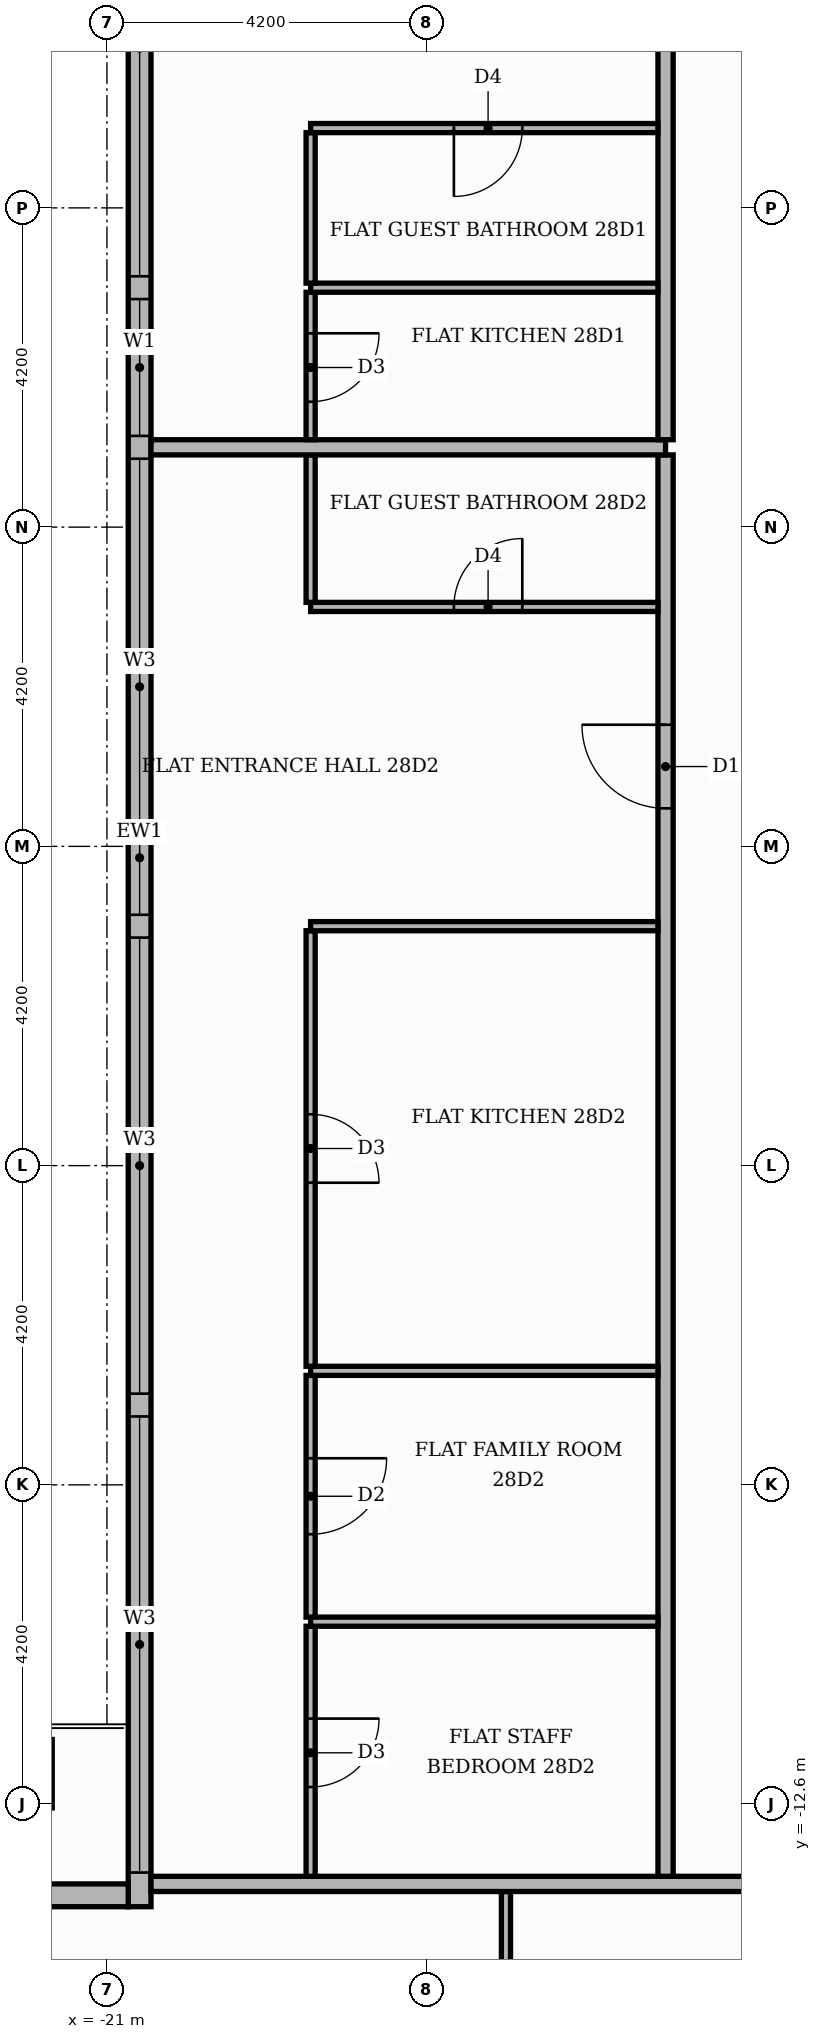
"""IFC4 building model, lengths in metres.
Left out: names, types, materials, properties, quantities, classifications, styles, units other than length and angle.
Written with IfcOpenShell. Run it as: python <this file> out.ifc"""

import sys

from ifc_helpers import new_model, si_unit, direction, frame, frame_2d, origin, place, context, subcontext, project, spatial, rectangle, extrude, element, fill, save


model = new_model("IFC4")
c1 = context("Model", 3, precision=1e-05, world=origin(), true_north=direction((0.0, 1.0)))
c2 = subcontext(c1, "Body", "Model", "MODEL_VIEW")
j1 = project(units=[si_unit("LENGTHUNIT", "METRE"), si_unit("PLANEANGLEUNIT", "RADIAN")], contexts=[c1])
p1 = place(None, origin())
s1 = spatial("IfcSite", under=j1, at=p1, CompositionType="ELEMENT")
p2 = place(p1, origin())
s2 = spatial("IfcBuilding", under=s1, at=p2, CompositionType="ELEMENT")
p3 = place(p2, frame((0.0, 0.0, 118.2)))
s3 = spatial("IfcBuildingStorey", under=s2, at=p3, CompositionType="ELEMENT", Elevation=118.2)
p4 = place(p3, frame((-20.57, 13.65, 0.0), z_axis=(0.0, 0.0, 1.0), x_axis=(0.0, -1.0, 0.0)))
e1 = element("IfcWall", 1, at=p4, inside=s3, PredefinedType="STANDARD", context=c2, shape_type="SweptSolid", body=[
    extrude(rectangle(XDim=27.6, YDim=0.3, at=frame_2d((13.8, 0.0))), origin(), (0.0, 0.0, 1.0), 3.48),
])
p5 = place(p4, frame((0.15, 0.0, 0.9)))
e2 = element("IfcOpeningElement", 2, at=p5, cuts=e1, PredefinedType="OPENING", context=c2, shape_type="SweptSolid", body=[
    extrude(rectangle(XDim=6.0, YDim=2.1, at=frame_2d((3.0, 1.05))), frame((0.0, 0.16, 0.0), z_axis=(0.0, -1.0, 0.0), x_axis=(1.0, 0.0, 0.0)), (0.0, 0.0, 1.0), 0.32),
])
p6 = place(p4, frame((6.45, 0.0, 0.9)))
e3 = element("IfcOpeningElement", 3, at=p6, cuts=e1, PredefinedType="OPENING", context=c2, shape_type="SweptSolid", body=[
    extrude(rectangle(XDim=1.8, YDim=2.1, at=frame_2d((0.9, 1.05))), frame((0.0, 0.16, 0.0), z_axis=(0.0, -1.0, 0.0), x_axis=(1.0, 0.0, 0.0)), (0.0, 0.0, 1.0), 0.32),
])
p7 = place(p4, frame((8.55, 0.0, 0.9)))
e4 = element("IfcOpeningElement", 4, at=p7, cuts=e1, PredefinedType="OPENING", context=c2, shape_type="SweptSolid", body=[
    extrude(rectangle(XDim=6.0, YDim=2.1, at=frame_2d((3.0, 1.05))), frame((0.0, 0.16, 0.0), z_axis=(0.0, -1.0, 0.0), x_axis=(1.0, 0.0, 0.0)), (0.0, 0.0, 1.0), 0.32),
])
p8 = place(p4, frame((14.85, 0.0, 0.9)))
e5 = element("IfcOpeningElement", 5, at=p8, cuts=e1, PredefinedType="OPENING", context=c2, shape_type="SweptSolid", body=[
    extrude(rectangle(XDim=6.0, YDim=2.1, at=frame_2d((3.0, 1.05))), frame((0.0, 0.16, 0.0), z_axis=(0.0, -1.0, 0.0), x_axis=(1.0, 0.0, 0.0)), (0.0, 0.0, 1.0), 0.32),
])
p9 = place(p4, frame((21.15, 0.0, 0.9)))
e6 = element("IfcOpeningElement", 6, at=p9, cuts=e1, PredefinedType="OPENING", context=c2, shape_type="SweptSolid", body=[
    extrude(rectangle(XDim=6.0, YDim=2.1, at=frame_2d((3.0, 1.05))), frame((0.0, 0.16, 0.0), z_axis=(0.0, -1.0, 0.0), x_axis=(1.0, 0.0, 0.0)), (0.0, 0.0, 1.0), 0.32),
])
p10 = place(p3, frame((-20.72, -13.8, 0.0), z_axis=(0.0, 0.0, 1.0), x_axis=(-1.0, 0.0, 0.0)))
e7 = element("IfcWall", 7, at=p10, inside=s3, PredefinedType="STANDARD", context=c2, shape_type="SweptSolid", body=[
    extrude(rectangle(XDim=5.0, YDim=0.3, at=frame_2d((2.5, 0.0))), origin(), (0.0, 0.0, 1.0), 3.48),
])
p11 = place(p10, frame((1.48, 0.0, 0.0)))
e8 = element("IfcOpeningElement", 8, at=p11, cuts=e7, PredefinedType="OPENING", context=c2, shape_type="SweptSolid", body=[
    extrude(rectangle(XDim=1.8, YDim=2.4, at=frame_2d((0.9, 1.2))), frame((0.0, 0.16, 0.0), z_axis=(0.0, -1.0, 0.0), x_axis=(1.0, 0.0, 0.0)), (0.0, 0.0, 1.0), 0.32),
])
p12 = place(p3, frame((-15.75, -20.36, 0.0), z_axis=(0.0, 0.0, 1.0), x_axis=(0.0, 1.0, 0.0)))
e9 = element("IfcWall", 9, at=p12, inside=s3, PredefinedType="PARTITIONING", context=c2, shape_type="SweptSolid", body=[
    extrude(rectangle(XDim=6.61, YDim=0.12, at=frame_2d((3.305, 0.0))), origin(), (0.0, 0.0, 1.0), 3.48),
])
p13 = place(p12, frame((2.825, 0.0, 0.0)))
e10 = element("IfcOpeningElement", 10, at=p13, cuts=e9, PredefinedType="OPENING", context=c2, shape_type="SweptSolid", body=[
    extrude(rectangle(XDim=1.0, YDim=2.1, at=frame_2d((0.5, 1.05))), frame((0.0, 0.07, 0.0), z_axis=(0.0, -1.0, 0.0), x_axis=(1.0, 0.0, 0.0)), (0.0, 0.0, 1.0), 0.14),
])
p14 = place(p3, frame((-20.42, -13.65, 0.0), z_axis=(0.0, 0.0, 1.0), x_axis=(1.0, 0.0, 0.0)))
e11 = element("IfcWall", 11, at=p14, inside=s3, PredefinedType="PARTITIONING", context=c2, shape_type="SweptSolid", body=[
    extrude(rectangle(XDim=34.07, YDim=0.2, at=frame_2d((17.035, 0.0))), origin(), (0.0, 0.0, 1.0), 3.48),
])
p15 = place(p14, frame((8.32, 0.0, 0.0)))
e12 = element("IfcOpeningElement", 12, at=p15, cuts=e11, PredefinedType="OPENING", context=c2, shape_type="SweptSolid", body=[
    extrude(rectangle(XDim=1.1, YDim=2.4, at=frame_2d((0.55, 1.2))), frame((0.0, 0.11, 0.0), z_axis=(0.0, -1.0, 0.0), x_axis=(1.0, 0.0, 0.0)), (0.0, 0.0, 1.0), 0.22),
])
p16 = place(p14, frame((20.92, 0.0, 0.0)))
e13 = element("IfcOpeningElement", 13, at=p16, cuts=e11, PredefinedType="OPENING", context=c2, shape_type="SweptSolid", body=[
    extrude(rectangle(XDim=1.1, YDim=2.4, at=frame_2d((0.55, 1.2))), frame((0.0, 0.11, 0.0), z_axis=(0.0, -1.0, 0.0), x_axis=(1.0, 0.0, 0.0)), (0.0, 0.0, 1.0), 0.22),
])
p17 = place(p3, frame((-18.32, -13.55, 0.0), z_axis=(0.0, 0.0, 1.0), x_axis=(0.0, 1.0, 0.0)))
e14 = element("IfcWall", 14, at=p17, inside=s3, PredefinedType="PARTITIONING", context=c2, shape_type="SweptSolid", body=[
    extrude(rectangle(XDim=3.29, YDim=0.12, at=frame_2d((1.645, 0.0))), origin(), (0.0, 0.0, 1.0), 3.48),
])
p18 = place(p17, frame((1.175, 0.0, 0.0)))
e15 = element("IfcOpeningElement", 15, at=p18, cuts=e14, PredefinedType="OPENING", context=c2, shape_type="SweptSolid", body=[
    extrude(rectangle(XDim=0.9, YDim=2.1, at=frame_2d((0.45, 1.05))), frame((0.0, 0.07, 0.0), z_axis=(0.0, -1.0, 0.0), x_axis=(1.0, 0.0, 0.0)), (0.0, 0.0, 1.0), 0.14),
])
p19 = place(p3, frame((-13.65, -13.55, 0.0), z_axis=(0.0, 0.0, 1.0), x_axis=(0.0, 1.0, 0.0)))
e16 = element("IfcWall", 16, at=p19, inside=s3, PredefinedType="PARTITIONING", context=c2, shape_type="SweptSolid", body=[
    extrude(rectangle(XDim=18.7, YDim=0.2, at=frame_2d((9.35, 0.0))), origin(), (0.0, 0.0, 1.0), 3.48),
])
p20 = place(p19, frame((14.05, 0.0, 0.0)))
e17 = element("IfcOpeningElement", 17, at=p20, cuts=e16, PredefinedType="OPENING", context=c2, shape_type="SweptSolid", body=[
    extrude(rectangle(XDim=1.1, YDim=2.4, at=frame_2d((0.55, 1.2))), frame((0.0, 0.11, 0.0), z_axis=(0.0, -1.0, 0.0), x_axis=(1.0, 0.0, 0.0)), (0.0, 0.0, 1.0), 0.22),
])
p21 = place(p3, frame((-18.32, -10.2, 0.0), z_axis=(0.0, 0.0, 1.0), x_axis=(1.0, 0.0, 0.0)))
e18 = element("IfcWall", 18, at=p21, inside=s3, PredefinedType="PARTITIONING", context=c2, shape_type="SweptSolid", body=[
    extrude(rectangle(XDim=4.57, YDim=0.12, at=frame_2d((2.285, 0.0))), origin(), (0.0, 0.0, 1.0), 3.48),
])
p22 = place(p3, frame((-18.32, -10.14, 0.0), z_axis=(0.0, 0.0, 1.0), x_axis=(0.0, 1.0, 0.0)))
e19 = element("IfcWall", 19, at=p22, inside=s3, PredefinedType="PARTITIONING", context=c2, shape_type="SweptSolid", body=[
    extrude(rectangle(XDim=3.18, YDim=0.12, at=frame_2d((1.59, 0.0))), origin(), (0.0, 0.0, 1.0), 3.48),
])
p23 = place(p22, frame((1.09, 0.0, 0.0)))
e20 = element("IfcOpeningElement", 20, at=p23, cuts=e19, PredefinedType="OPENING", context=c2, shape_type="SweptSolid", body=[
    extrude(rectangle(XDim=1.0, YDim=2.1, at=frame_2d((0.5, 1.05))), frame((0.0, 0.07, 0.0), z_axis=(0.0, -1.0, 0.0), x_axis=(1.0, 0.0, 0.0)), (0.0, 0.0, 1.0), 0.14),
])
p24 = place(p3, frame((-18.32, -6.9, 0.0), z_axis=(0.0, 0.0, 1.0), x_axis=(1.0, 0.0, 0.0)))
e21 = element("IfcWall", 21, at=p24, inside=s3, PredefinedType="PARTITIONING", context=c2, shape_type="SweptSolid", body=[
    extrude(rectangle(XDim=4.57, YDim=0.12, at=frame_2d((2.285, 0.0))), origin(), (0.0, 0.0, 1.0), 3.48),
])
p25 = place(p3, frame((-18.32, -6.84, 0.0), z_axis=(0.0, 0.0, 1.0), x_axis=(0.0, 1.0, 0.0)))
e22 = element("IfcWall", 22, at=p25, inside=s3, PredefinedType="PARTITIONING", context=c2, shape_type="SweptSolid", body=[
    extrude(rectangle(XDim=5.73, YDim=0.12, at=frame_2d((2.865, 0.0))), origin(), (0.0, 0.0, 1.0), 3.48),
])
p26 = place(p25, frame((2.415, 0.0, 0.0)))
e23 = element("IfcOpeningElement", 23, at=p26, cuts=e22, PredefinedType="OPENING", context=c2, shape_type="SweptSolid", body=[
    extrude(rectangle(XDim=0.9, YDim=2.1, at=frame_2d((0.45, 1.05))), frame((0.0, 0.07, 0.0), z_axis=(0.0, -1.0, 0.0), x_axis=(1.0, 0.0, 0.0)), (0.0, 0.0, 1.0), 0.14),
])
p27 = place(p3, frame((-18.32, -1.05, 0.0), z_axis=(0.0, 0.0, 1.0), x_axis=(1.0, 0.0, 0.0)))
e24 = element("IfcWall", 24, at=p27, inside=s3, PredefinedType="PARTITIONING", context=c2, shape_type="SweptSolid", body=[
    extrude(rectangle(XDim=4.57, YDim=0.12, at=frame_2d((2.285, 0.0))), origin(), (0.0, 0.0, 1.0), 3.48),
])
p28 = place(p3, frame((-18.32, 3.15, 0.0), z_axis=(0.0, 0.0, 1.0), x_axis=(1.0, 0.0, 0.0)))
e25 = element("IfcWall", 25, at=p28, inside=s3, PredefinedType="PARTITIONING", context=c2, shape_type="SweptSolid", body=[
    extrude(rectangle(XDim=4.57, YDim=0.12, at=frame_2d((2.285, 0.0))), origin(), (0.0, 0.0, 1.0), 3.48),
])
p29 = place(p28, frame((1.885, 0.0, 0.0)))
e26 = element("IfcOpeningElement", 26, at=p29, cuts=e25, PredefinedType="OPENING", context=c2, shape_type="SweptSolid", body=[
    extrude(rectangle(XDim=0.9, YDim=2.1, at=frame_2d((0.45, 1.05))), frame((0.0, 0.07, 0.0), z_axis=(0.0, -1.0, 0.0), x_axis=(1.0, 0.0, 0.0)), (0.0, 0.0, 1.0), 0.14),
])
p30 = place(p3, frame((-18.32, 3.21, 0.0), z_axis=(0.0, 0.0, 1.0), x_axis=(0.0, 1.0, 0.0)))
e27 = element("IfcWall", 27, at=p30, inside=s3, PredefinedType="PARTITIONING", context=c2, shape_type="SweptSolid", body=[
    extrude(rectangle(XDim=1.94, YDim=0.12, at=frame_2d((0.97, 0.0))), origin(), (0.0, 0.0, 1.0), 3.48),
])
p31 = place(p3, frame((-20.42, 5.25, 0.0), z_axis=(0.0, 0.0, 1.0), x_axis=(1.0, 0.0, 0.0)))
e28 = element("IfcWall", 28, at=p31, inside=s3, PredefinedType="PARTITIONING", context=c2, shape_type="SweptSolid", body=[
    extrude(rectangle(XDim=6.77, YDim=0.2, at=frame_2d((3.385, 0.0))), origin(), (0.0, 0.0, 1.0), 3.48),
])
p32 = place(p3, frame((-18.32, 5.35, 0.0), z_axis=(0.0, 0.0, 1.0), x_axis=(0.0, 1.0, 0.0)))
e29 = element("IfcWall", 29, at=p32, inside=s3, PredefinedType="PARTITIONING", context=c2, shape_type="SweptSolid", body=[
    extrude(rectangle(XDim=1.94, YDim=0.12, at=frame_2d((0.97, 0.0))), origin(), (0.0, 0.0, 1.0), 3.48),
])
p33 = place(p32, frame((0.5, 0.0, 0.0)))
e30 = element("IfcOpeningElement", 30, at=p33, cuts=e29, PredefinedType="OPENING", context=c2, shape_type="SweptSolid", body=[
    extrude(rectangle(XDim=0.9, YDim=2.1, at=frame_2d((0.45, 1.05))), frame((0.0, 0.07, 0.0), z_axis=(0.0, -1.0, 0.0), x_axis=(1.0, 0.0, 0.0)), (0.0, 0.0, 1.0), 0.14),
])
p34 = place(p3, frame((-13.65, 5.35, 0.0), z_axis=(0.0, 0.0, 1.0), x_axis=(0.0, 1.0, 0.0)))
e31 = element("IfcWall", 31, at=p34, inside=s3, PredefinedType="PARTITIONING", context=c2, shape_type="SweptSolid", body=[
    extrude(rectangle(XDim=8.2, YDim=0.2, at=frame_2d((4.1, 0.0))), origin(), (0.0, 0.0, 1.0), 3.48),
])
p35 = place(p34, frame((5.65, 0.0, 0.0)))
e32 = element("IfcOpeningElement", 32, at=p35, cuts=e31, PredefinedType="OPENING", context=c2, shape_type="SweptSolid", body=[
    extrude(rectangle(XDim=1.1, YDim=2.4, at=frame_2d((0.55, 1.2))), frame((0.0, 0.11, 0.0), z_axis=(0.0, -1.0, 0.0), x_axis=(1.0, 0.0, 0.0)), (0.0, 0.0, 1.0), 0.22),
])
p36 = place(p3, frame((-18.32, 7.35, 0.0), z_axis=(0.0, 0.0, 1.0), x_axis=(1.0, 0.0, 0.0)))
e33 = element("IfcWall", 33, at=p36, inside=s3, PredefinedType="PARTITIONING", context=c2, shape_type="SweptSolid", body=[
    extrude(rectangle(XDim=4.57, YDim=0.12, at=frame_2d((2.285, 0.0))), origin(), (0.0, 0.0, 1.0), 3.48),
])
p37 = place(p3, frame((-18.32, 7.41, 0.0), z_axis=(0.0, 0.0, 1.0), x_axis=(0.0, 1.0, 0.0)))
e34 = element("IfcWall", 34, at=p37, inside=s3, PredefinedType="PARTITIONING", context=c2, shape_type="SweptSolid", body=[
    extrude(rectangle(XDim=1.98, YDim=0.12, at=frame_2d((0.99, 0.0))), origin(), (0.0, 0.0, 1.0), 3.48),
])
p38 = place(p3, frame((-18.32, 9.45, 0.0), z_axis=(0.0, 0.0, 1.0), x_axis=(1.0, 0.0, 0.0)))
e35 = element("IfcWall", 35, at=p38, inside=s3, PredefinedType="PARTITIONING", context=c2, shape_type="SweptSolid", body=[
    extrude(rectangle(XDim=4.57, YDim=0.12, at=frame_2d((2.285, 0.0))), origin(), (0.0, 0.0, 1.0), 3.48),
])
p39 = place(p38, frame((1.885, 0.0, 0.0)))
e36 = element("IfcOpeningElement", 36, at=p39, cuts=e35, PredefinedType="OPENING", context=c2, shape_type="SweptSolid", body=[
    extrude(rectangle(XDim=0.9, YDim=2.1, at=frame_2d((0.45, 1.05))), frame((0.0, 0.07, 0.0), z_axis=(0.0, -1.0, 0.0), x_axis=(1.0, 0.0, 0.0)), (0.0, 0.0, 1.0), 0.14),
])
p40 = place(p5, origin())
e37 = element("IfcWindow", 37, at=p40, inside=s3, PartitioningType="SINGLE_PANEL", PredefinedType="WINDOW", context=c2, shape_type="SweptSolid", body=[
    extrude(rectangle(XDim=6.0, YDim=2.1, at=frame_2d((3.0, 1.05))), frame((0.0, 0.03, 0.0), z_axis=(0.0, -1.0, 0.0), x_axis=(1.0, 0.0, 0.0)), (0.0, 0.0, 1.0), 0.06),
])
fill(e2, e37)
p41 = place(p6, origin())
e38 = element("IfcWindow", 38, at=p41, inside=s3, PartitioningType="SINGLE_PANEL", PredefinedType="WINDOW", context=c2, shape_type="SweptSolid", body=[
    extrude(rectangle(XDim=1.8, YDim=2.1, at=frame_2d((0.9, 1.05))), frame((0.0, 0.03, 0.0), z_axis=(0.0, -1.0, 0.0), x_axis=(1.0, 0.0, 0.0)), (0.0, 0.0, 1.0), 0.06),
])
fill(e3, e38)
p42 = place(p7, origin())
e39 = element("IfcWindow", 39, at=p42, inside=s3, PartitioningType="SINGLE_PANEL", PredefinedType="WINDOW", context=c2, shape_type="SweptSolid", body=[
    extrude(rectangle(XDim=6.0, YDim=2.1, at=frame_2d((3.0, 1.05))), frame((0.0, 0.03, 0.0), z_axis=(0.0, -1.0, 0.0), x_axis=(1.0, 0.0, 0.0)), (0.0, 0.0, 1.0), 0.06),
])
fill(e4, e39)
p43 = place(p8, origin())
e40 = element("IfcWindow", 40, at=p43, inside=s3, PartitioningType="SINGLE_PANEL", PredefinedType="WINDOW", context=c2, shape_type="SweptSolid", body=[
    extrude(rectangle(XDim=6.0, YDim=2.1, at=frame_2d((3.0, 1.05))), frame((0.0, 0.03, 0.0), z_axis=(0.0, -1.0, 0.0), x_axis=(1.0, 0.0, 0.0)), (0.0, 0.0, 1.0), 0.06),
])
fill(e5, e40)
p44 = place(p9, origin())
e41 = element("IfcWindow", 41, at=p44, inside=s3, PartitioningType="SINGLE_PANEL", PredefinedType="WINDOW", context=c2, shape_type="SweptSolid", body=[
    extrude(rectangle(XDim=6.0, YDim=2.1, at=frame_2d((3.0, 1.05))), frame((0.0, 0.03, 0.0), z_axis=(0.0, -1.0, 0.0), x_axis=(1.0, 0.0, 0.0)), (0.0, 0.0, 1.0), 0.06),
])
fill(e6, e41)
p45 = place(p39, frame((0.9, 0.0, 0.0), z_axis=(0.0, 0.0, 1.0), x_axis=(-1.0, 0.0, 0.0)))
e42 = element("IfcDoor", 42, at=p45, inside=s3, OperationType="SINGLE_SWING_LEFT", PredefinedType="DOOR", context=c2, shape_type="SweptSolid", body=[
    extrude(rectangle(XDim=0.9, YDim=2.1, at=frame_2d((0.45, 1.05))), frame((0.0, 0.025, 0.0), z_axis=(0.0, -1.0, 0.0), x_axis=(1.0, 0.0, 0.0)), (0.0, 0.0, 1.0), 0.05),
])
fill(e36, e42)
p46 = place(p33, frame((0.9, 0.0, 0.0), z_axis=(0.0, 0.0, 1.0), x_axis=(-1.0, 0.0, 0.0)))
e43 = element("IfcDoor", 43, at=p46, inside=s3, OperationType="SINGLE_SWING_RIGHT", PredefinedType="DOOR", context=c2, shape_type="SweptSolid", body=[
    extrude(rectangle(XDim=0.9, YDim=2.1, at=frame_2d((0.45, 1.05))), frame((0.0, 0.025, 0.0), z_axis=(0.0, -1.0, 0.0), x_axis=(1.0, 0.0, 0.0)), (0.0, 0.0, 1.0), 0.05),
])
fill(e30, e43)
p47 = place(p20, origin())
e44 = element("IfcDoor", 44, at=p47, inside=s3, OperationType="SINGLE_SWING_RIGHT", PredefinedType="DOOR", context=c2, shape_type="SweptSolid", body=[
    extrude(rectangle(XDim=1.1, YDim=2.4, at=frame_2d((0.55, 1.2))), frame((0.0, 0.025, 0.0), z_axis=(0.0, -1.0, 0.0), x_axis=(1.0, 0.0, 0.0)), (0.0, 0.0, 1.0), 0.05),
])
fill(e17, e44)
p48 = place(p29, origin())
e45 = element("IfcDoor", 45, at=p48, inside=s3, OperationType="SINGLE_SWING_RIGHT", PredefinedType="DOOR", context=c2, shape_type="SweptSolid", body=[
    extrude(rectangle(XDim=0.9, YDim=2.1, at=frame_2d((0.45, 1.05))), frame((0.0, 0.025, 0.0), z_axis=(0.0, -1.0, 0.0), x_axis=(1.0, 0.0, 0.0)), (0.0, 0.0, 1.0), 0.05),
])
fill(e26, e45)
p49 = place(p26, frame((0.9, 0.0, 0.0), z_axis=(0.0, 0.0, 1.0), x_axis=(-1.0, 0.0, 0.0)))
e46 = element("IfcDoor", 46, at=p49, inside=s3, OperationType="SINGLE_SWING_LEFT", PredefinedType="DOOR", context=c2, shape_type="SweptSolid", body=[
    extrude(rectangle(XDim=0.9, YDim=2.1, at=frame_2d((0.45, 1.05))), frame((0.0, 0.025, 0.0), z_axis=(0.0, -1.0, 0.0), x_axis=(1.0, 0.0, 0.0)), (0.0, 0.0, 1.0), 0.05),
])
fill(e23, e46)
p50 = place(p23, frame((1.0, 0.0, 0.0), z_axis=(0.0, 0.0, 1.0), x_axis=(-1.0, 0.0, 0.0)))
e47 = element("IfcDoor", 47, at=p50, inside=s3, OperationType="SINGLE_SWING_RIGHT", PredefinedType="DOOR", context=c2, shape_type="SweptSolid", body=[
    extrude(rectangle(XDim=1.0, YDim=2.1, at=frame_2d((0.5, 1.05))), frame((0.0, 0.025, 0.0), z_axis=(0.0, -1.0, 0.0), x_axis=(1.0, 0.0, 0.0)), (0.0, 0.0, 1.0), 0.05),
])
fill(e20, e47)
p51 = place(p18, frame((0.9, 0.0, 0.0), z_axis=(0.0, 0.0, 1.0), x_axis=(-1.0, 0.0, 0.0)))
e48 = element("IfcDoor", 48, at=p51, inside=s3, OperationType="SINGLE_SWING_RIGHT", PredefinedType="DOOR", context=c2, shape_type="SweptSolid", body=[
    extrude(rectangle(XDim=0.9, YDim=2.1, at=frame_2d((0.45, 1.05))), frame((0.0, 0.025, 0.0), z_axis=(0.0, -1.0, 0.0), x_axis=(1.0, 0.0, 0.0)), (0.0, 0.0, 1.0), 0.05),
])
fill(e15, e48)
save(model, sys.argv[1])
